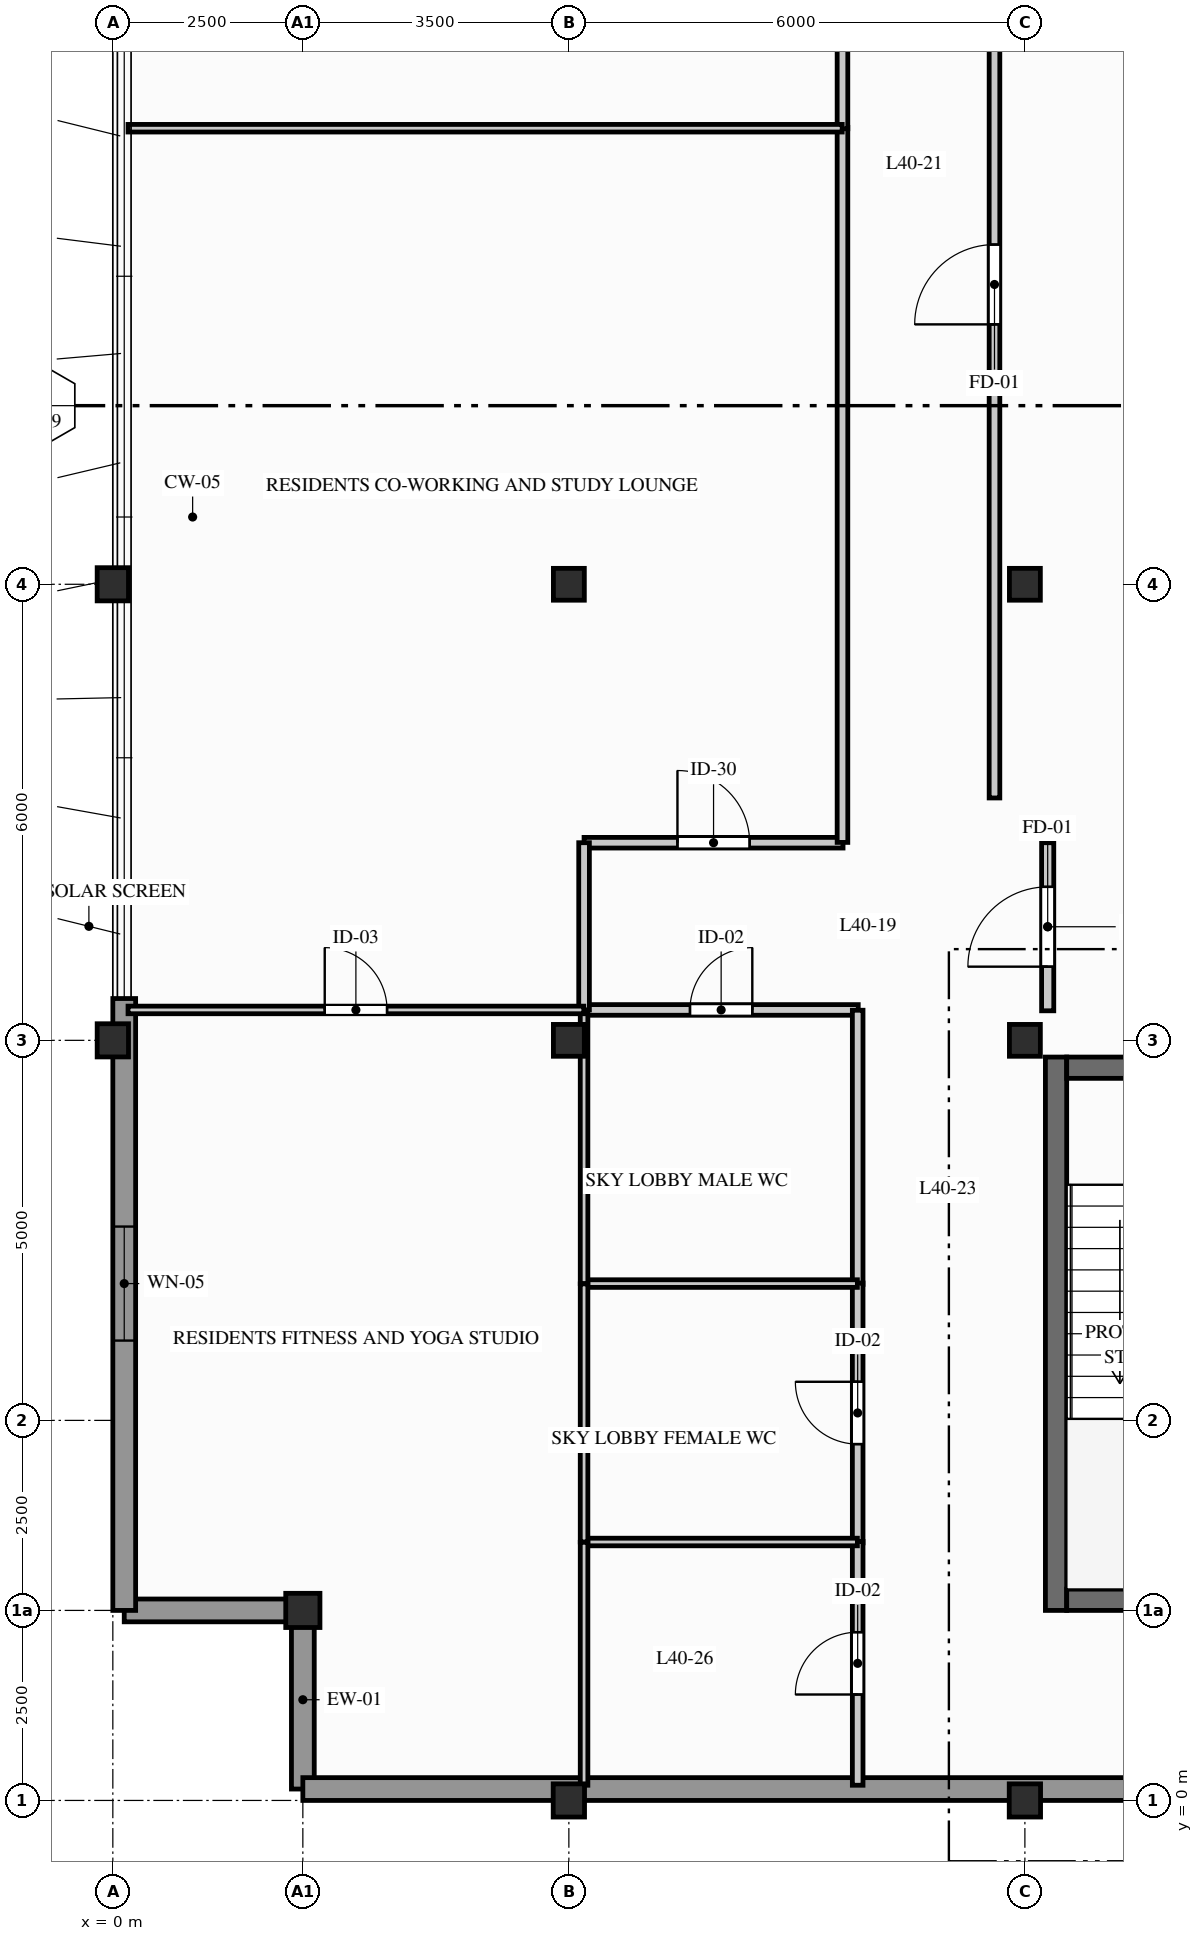
"""IFC4 building model, lengths in metres.
Left out: names, types, materials, properties, quantities, classifications, styles, units other than length and angle.
Written with IfcOpenShell. Run it as: python <this file> out.ifc"""

import sys

from ifc_helpers import new_model, si_unit, direction, frame, frame_2d, origin, origin_2d, place, context, subcontext, project, spatial, rectangle, hollow_rectangle, i_section, extrude, element, fill, save


model = new_model("IFC4")
c1 = context("Model", 3, precision=1e-05, world=origin(), true_north=direction((0.0, 1.0)))
c2 = subcontext(c1, "Body", "Model", "MODEL_VIEW")
j1 = project(units=[si_unit("LENGTHUNIT", "METRE"), si_unit("PLANEANGLEUNIT", "RADIAN")], contexts=[c1])
p1 = place(None, origin())
s1 = spatial("IfcSite", under=j1, at=p1, CompositionType="ELEMENT")
p2 = place(p1, origin())
s2 = spatial("IfcBuilding", under=s1, at=p2, CompositionType="ELEMENT")
p3 = place(p2, frame((0.0, 0.0, 134.5)))
s3 = spatial("IfcBuildingStorey", under=s2, at=p3, CompositionType="ELEMENT", Elevation=134.5)
for number, where, z_axis, x_axis in (
    (1, (0.0, 10.0, 0.0), (0.0, 0.0, 1.0), (1.0, 0.0, 0.0)),
    (2, (0.0, 16.0, 0.0), (0.0, 0.0, 1.0), (1.0, 0.0, 0.0)),
):
    element("IfcColumn", number, at=place(p3, frame(where, z_axis=z_axis, x_axis=x_axis)), inside=s3, PredefinedType="COLUMN", context=c2, shape_type="SweptSolid", body=[
        extrude(i_section(OverallWidth=0.412, OverallDepth=0.437, WebThickness=0.036, FlangeThickness=0.058, FilletRadius=0.015, at=origin_2d()), origin(), (0.0, 0.0, 1.0), 4.2),
    ])
p4 = place(p3, frame((2.5, 2.5, 0.0), z_axis=(0.0, 0.0, 1.0), x_axis=(1.0, 0.0, 0.0)))
e3 = element("IfcColumn", 3, at=p4, inside=s3, PredefinedType="COLUMN", context=c2, shape_type="SweptSolid", body=[
    extrude(hollow_rectangle(XDim=0.45, YDim=0.45, WallThickness=0.025, InnerFilletRadius=0.012, OuterFilletRadius=0.024, at=origin_2d()), origin(), (0.0, 0.0, 1.0), 4.2),
])
p5 = place(p3, frame((6.0, 0.0, 0.0), z_axis=(0.0, 0.0, 1.0), x_axis=(1.0, 0.0, 0.0)))
e4 = element("IfcColumn", 4, at=p5, inside=s3, PredefinedType="COLUMN", context=c2, shape_type="SweptSolid", body=[
    extrude(i_section(OverallWidth=0.412, OverallDepth=0.437, WebThickness=0.036, FlangeThickness=0.058, FilletRadius=0.015, at=origin_2d()), origin(), (0.0, 0.0, 1.0), 4.2),
])
for number, where, z_axis, x_axis in (
    (5, (6.0, 10.0, 0.0), (0.0, 0.0, 1.0), (1.0, 0.0, 0.0)),
    (6, (6.0, 16.0, 0.0), (0.0, 0.0, 1.0), (1.0, 0.0, 0.0)),
):
    element("IfcColumn", number, at=place(p3, frame(where, z_axis=z_axis, x_axis=x_axis)), inside=s3, PredefinedType="COLUMN", context=c2, shape_type="SweptSolid", body=[
        extrude(i_section(OverallWidth=0.407, OverallDepth=0.419, WebThickness=0.031, FlangeThickness=0.049, FilletRadius=0.015, at=origin_2d()), origin(), (0.0, 0.0, 1.0), 4.2),
    ])
p6 = place(p3, frame((12.0, 0.0, 0.0), z_axis=(0.0, 0.0, 1.0), x_axis=(1.0, 0.0, 0.0)))
e7 = element("IfcColumn", 7, at=p6, inside=s3, PredefinedType="COLUMN", context=c2, shape_type="SweptSolid", body=[
    extrude(i_section(OverallWidth=0.412, OverallDepth=0.437, WebThickness=0.036, FlangeThickness=0.058, FilletRadius=0.015, at=origin_2d()), origin(), (0.0, 0.0, 1.0), 4.2),
])
for number, where, z_axis, x_axis in (
    (8, (12.0, 10.0, 0.0), (0.0, 0.0, 1.0), (1.0, 0.0, 0.0)),
    (9, (12.0, 16.0, 0.0), (0.0, 0.0, 1.0), (1.0, 0.0, 0.0)),
):
    element("IfcColumn", number, at=place(p3, frame(where, z_axis=z_axis, x_axis=x_axis)), inside=s3, PredefinedType="COLUMN", context=c2, shape_type="SweptSolid", body=[
        extrude(i_section(OverallWidth=0.407, OverallDepth=0.419, WebThickness=0.031, FlangeThickness=0.049, FilletRadius=0.015, at=origin_2d()), origin(), (0.0, 0.0, 1.0), 4.2),
    ])
for number, where, z_axis, x_axis in (
    (10, (2.5, 2.5, 0.0), (0.0, 0.0, 1.0), (0.0, -1.0, 0.0)),
    (11, (0.15, 2.5, 0.0), (0.0, 0.0, 1.0), (1.0, 0.0, 0.0)),
):
    element("IfcWall", number, at=place(p3, frame(where, z_axis=z_axis, x_axis=x_axis)), inside=s3, PredefinedType="STANDARD", context=c2, shape_type="SweptSolid", body=[
        extrude(rectangle(XDim=2.35, YDim=0.3, at=frame_2d((1.175, 0.0))), origin(), (0.0, 0.0, 1.0), 3.98),
    ])
p7 = place(p3, frame((2.5, 0.15, 0.0), z_axis=(0.0, 0.0, 1.0), x_axis=(1.0, 0.0, 0.0)))
e12 = element("IfcWall", 12, at=p7, inside=s3, PredefinedType="STANDARD", context=c2, shape_type="SweptSolid", body=[
    extrude(rectangle(XDim=55.0, YDim=0.3, at=frame_2d((27.5, 0.0))), origin(), (0.0, 0.0, 1.0), 3.422),
])
p8 = place(p3, frame((0.15, 10.55, 0.0), z_axis=(0.0, 0.0, 1.0), x_axis=(0.0, -1.0, 0.0)))
e13 = element("IfcWall", 13, at=p8, inside=s3, PredefinedType="STANDARD", context=c2, shape_type="SweptSolid", body=[
    extrude(rectangle(XDim=8.05, YDim=0.3, at=frame_2d((4.025, 0.0))), origin(), (0.0, 0.0, 1.0), 3.98),
])
p9 = place(p8, frame((3.0, 0.0, 0.95)))
e14 = element("IfcOpeningElement", 14, at=p9, cuts=e13, PredefinedType="OPENING", context=c2, shape_type="SweptSolid", body=[
    extrude(rectangle(XDim=1.5, YDim=1.8, at=frame_2d((0.75, 0.9))), frame((0.0, 0.16, 0.0), z_axis=(0.0, -1.0, 0.0), x_axis=(1.0, 0.0, 0.0)), (0.0, 0.0, 1.0), 0.32),
])
p10 = place(p3, frame((12.41, 2.5, 0.0), z_axis=(0.0, 0.0, 1.0), x_axis=(0.0, 1.0, 0.0)))
e15 = element("IfcWall", 15, at=p10, inside=s3, PredefinedType="SHEAR", context=c2, shape_type="SweptSolid", body=[
    extrude(rectangle(XDim=7.28, YDim=0.28, at=frame_2d((3.64, 0.0))), origin(), (0.0, 0.0, 1.0), 3.98),
])
p11 = place(p3, frame((12.55, 2.64, 0.0), z_axis=(0.0, 0.0, 1.0), x_axis=(1.0, 0.0, 0.0)))
e16 = element("IfcWall", 16, at=p11, inside=s3, PredefinedType="SHEAR", context=c2, shape_type="SweptSolid", body=[
    extrude(rectangle(XDim=2.95, YDim=0.28, at=frame_2d((1.475, 0.0))), origin(), (0.0, 0.0, 1.0), 3.98),
])
p12 = place(p3, frame((15.5, 9.64, 0.0), z_axis=(0.0, 0.0, 1.0), x_axis=(-1.0, 0.0, 0.0)))
e17 = element("IfcWall", 17, at=p12, inside=s3, PredefinedType="SHEAR", context=c2, shape_type="SweptSolid", body=[
    extrude(rectangle(XDim=2.95, YDim=0.28, at=frame_2d((1.475, 0.0))), origin(), (0.0, 0.0, 1.0), 3.98),
])
p13 = place(p12, frame((0.95, 0.0, 0.0)))
e18 = element("IfcOpeningElement", 18, at=p13, cuts=e17, PredefinedType="OPENING", context=c2, shape_type="SweptSolid", body=[
    extrude(rectangle(XDim=1.05, YDim=2.06, at=frame_2d((0.525, 1.03))), frame((0.0, 0.15, 0.0), z_axis=(0.0, -1.0, 0.0), x_axis=(1.0, 0.0, 0.0)), (0.0, 0.0, 1.0), 0.3),
])
p14 = place(p3, frame((12.3, 10.389, 0.0), z_axis=(0.0, 0.0, 1.0), x_axis=(0.0, 1.0, 0.0)))
e19 = element("IfcWall", 19, at=p14, inside=s3, PredefinedType="PARTITIONING", context=c2, shape_type="SweptSolid", body=[
    extrude(rectangle(XDim=2.211, YDim=0.16, at=frame_2d((1.106, 0.0))), origin(), (0.0, 0.0, 1.0), 3.98),
])
p15 = place(p14, frame((0.581, 0.0, 0.0)))
e20 = element("IfcOpeningElement", 20, at=p15, cuts=e19, PredefinedType="OPENING", context=c2, shape_type="SweptSolid", body=[
    extrude(rectangle(XDim=1.05, YDim=2.06, at=frame_2d((0.525, 1.03))), frame((0.0, 0.09, 0.0), z_axis=(0.0, -1.0, 0.0), x_axis=(1.0, 0.0, 0.0)), (0.0, 0.0, 1.0), 0.18),
])
p16 = place(p3, frame((6.2, 10.4, 0.0), z_axis=(0.0, 0.0, 1.0), x_axis=(1.0, 0.0, 0.0)))
e21 = element("IfcWall", 21, at=p16, inside=s3, PredefinedType="PARTITIONING", context=c2, shape_type="SweptSolid", body=[
    extrude(rectangle(XDim=3.607, YDim=0.14, at=frame_2d((1.804, 0.0))), origin(), (0.0, 0.0, 1.0), 3.98),
])
p17 = place(p16, frame((1.394, 0.0, 0.0)))
e22 = element("IfcOpeningElement", 22, at=p17, cuts=e21, PredefinedType="OPENING", context=c2, shape_type="SweptSolid", body=[
    extrude(rectangle(XDim=0.82, YDim=2.02, at=frame_2d((0.41, 1.01))), frame((0.0, 0.08, 0.0), z_axis=(0.0, -1.0, 0.0), x_axis=(1.0, 0.0, 0.0)), (0.0, 0.0, 1.0), 0.16),
])
p18 = place(p3, frame((6.2, 12.6, 0.0), z_axis=(0.0, 0.0, 1.0), x_axis=(1.0, 0.0, 0.0)))
e23 = element("IfcWall", 23, at=p18, inside=s3, PredefinedType="PARTITIONING", context=c2, shape_type="SweptSolid", body=[
    extrude(rectangle(XDim=3.407, YDim=0.14, at=frame_2d((1.704, 0.0))), origin(), (0.0, 0.0, 1.0), 3.98),
])
p19 = place(p18, frame((1.229, 0.0, 0.0)))
e24 = element("IfcOpeningElement", 24, at=p19, cuts=e23, PredefinedType="OPENING", context=c2, shape_type="SweptSolid", body=[
    extrude(rectangle(XDim=0.95, YDim=2.05, at=frame_2d((0.475, 1.025))), frame((0.0, 0.08, 0.0), z_axis=(0.0, -1.0, 0.0), x_axis=(1.0, 0.0, 0.0)), (0.0, 0.0, 1.0), 0.16),
])
p20 = place(p3, frame((6.2, 10.4, 0.0), z_axis=(0.0, 0.0, 1.0), x_axis=(0.0, 1.0, 0.0)))
e25 = element("IfcWall", 25, at=p20, inside=s3, PredefinedType="PARTITIONING", context=c2, shape_type="SweptSolid", body=[
    extrude(rectangle(XDim=2.2, YDim=0.14, at=frame_2d((1.1, 0.0))), origin(), (0.0, 0.0, 1.0), 3.343),
])
p21 = place(p3, frame((9.6, 12.604, 0.0), z_axis=(0.0, 0.0, 1.0), x_axis=(0.0, 1.0, 0.0)))
e26 = element("IfcWall", 26, at=p21, inside=s3, PredefinedType="PARTITIONING", context=c2, shape_type="SweptSolid", body=[
    extrude(rectangle(XDim=9.407, YDim=0.14, at=frame_2d((4.704, 0.0))), origin(), (0.0, 0.0, 1.0), 3.343),
])
p22 = place(p3, frame((9.6, 21.993, 0.0), z_axis=(0.0, 0.0, 1.0), x_axis=(0.0, 1.0, 0.0)))
e27 = element("IfcWall", 27, at=p22, inside=s3, PredefinedType="PARTITIONING", context=c2, shape_type="SweptSolid", body=[
    extrude(rectangle(XDim=4.707, YDim=0.14, at=frame_2d((2.354, 0.0))), origin(), (0.0, 0.0, 1.0), 3.343),
])
p23 = place(p22, frame((1.879, 0.0, 0.0)))
e28 = element("IfcOpeningElement", 28, at=p23, cuts=e27, PredefinedType="OPENING", context=c2, shape_type="SweptSolid", body=[
    extrude(rectangle(XDim=0.95, YDim=2.05, at=frame_2d((0.475, 1.025))), frame((0.0, 0.08, 0.0), z_axis=(0.0, -1.0, 0.0), x_axis=(1.0, 0.0, 0.0)), (0.0, 0.0, 1.0), 0.16),
])
p24 = place(p3, frame((11.6, 13.189, 0.0), z_axis=(0.0, 0.0, 1.0), x_axis=(0.0, 1.0, 0.0)))
e29 = element("IfcWall", 29, at=p24, inside=s3, PredefinedType="PARTITIONING", context=c2, shape_type="SweptSolid", body=[
    extrude(rectangle(XDim=13.511, YDim=0.14, at=frame_2d((6.756, 0.0))), origin(), (0.0, 0.0, 1.0), 3.343),
])
p25 = place(p24, frame((6.231, 0.0, 0.0)))
e30 = element("IfcOpeningElement", 30, at=p25, cuts=e29, PredefinedType="OPENING", context=c2, shape_type="SweptSolid", body=[
    extrude(rectangle(XDim=1.05, YDim=2.06, at=frame_2d((0.525, 1.03))), frame((0.0, 0.08, 0.0), z_axis=(0.0, -1.0, 0.0), x_axis=(1.0, 0.0, 0.0)), (0.0, 0.0, 1.0), 0.16),
])
p26 = place(p3, frame((9.8, 6.789, 0.0), z_axis=(0.0, 0.0, 1.0), x_axis=(0.0, 1.0, 0.0)))
e31 = element("IfcWall", 31, at=p26, inside=s3, PredefinedType="PARTITIONING", context=c2, shape_type="SweptSolid", body=[
    extrude(rectangle(XDim=3.607, YDim=0.14, at=frame_2d((1.804, 0.0))), origin(), (0.0, 0.0, 1.0), 3.343),
])
p27 = place(p3, frame((9.8, 3.389, 0.0), z_axis=(0.0, 0.0, 1.0), x_axis=(0.0, 1.0, 0.0)))
e32 = element("IfcWall", 32, at=p27, inside=s3, PredefinedType="PARTITIONING", context=c2, shape_type="SweptSolid", body=[
    extrude(rectangle(XDim=3.419, YDim=0.14, at=frame_2d((1.709, 0.0))), origin(), (0.0, 0.0, 1.0), 3.98),
])
p28 = place(p27, frame((1.299, 0.0, 0.0)))
e33 = element("IfcOpeningElement", 33, at=p28, cuts=e32, PredefinedType="OPENING", context=c2, shape_type="SweptSolid", body=[
    extrude(rectangle(XDim=0.82, YDim=2.02, at=frame_2d((0.41, 1.01))), frame((0.0, 0.08, 0.0), z_axis=(0.0, -1.0, 0.0), x_axis=(1.0, 0.0, 0.0)), (0.0, 0.0, 1.0), 0.16),
])
p29 = place(p3, frame((9.8, 0.2, 0.0), z_axis=(0.0, 0.0, 1.0), x_axis=(0.0, 1.0, 0.0)))
e34 = element("IfcWall", 34, at=p29, inside=s3, PredefinedType="PARTITIONING", context=c2, shape_type="SweptSolid", body=[
    extrude(rectangle(XDim=3.207, YDim=0.14, at=frame_2d((1.604, 0.0))), origin(), (0.0, 0.0, 1.0), 3.98),
])
p30 = place(p29, frame((1.194, 0.0, 0.0)))
e35 = element("IfcOpeningElement", 35, at=p30, cuts=e34, PredefinedType="OPENING", context=c2, shape_type="SweptSolid", body=[
    extrude(rectangle(XDim=0.82, YDim=2.02, at=frame_2d((0.41, 1.01))), frame((0.0, 0.08, 0.0), z_axis=(0.0, -1.0, 0.0), x_axis=(1.0, 0.0, 0.0)), (0.0, 0.0, 1.0), 0.16),
])
p31 = place(p3, frame((6.2, 6.8, 0.0), z_axis=(0.0, 0.0, 1.0), x_axis=(1.0, 0.0, 0.0)))
e36 = element("IfcWall", 36, at=p31, inside=s3, PredefinedType="PARTITIONING", context=c2, shape_type="SweptSolid", body=[
    extrude(rectangle(XDim=3.596, YDim=0.1, at=frame_2d((1.798, 0.0))), origin(), (0.0, 0.0, 1.0), 3.98),
])
p32 = place(p3, frame((6.2, 6.8, 0.0), z_axis=(0.0, 0.0, 1.0), x_axis=(0.0, 1.0, 0.0)))
e37 = element("IfcWall", 37, at=p32, inside=s3, PredefinedType="PARTITIONING", context=c2, shape_type="SweptSolid", body=[
    extrude(rectangle(XDim=3.596, YDim=0.1, at=frame_2d((1.798, 0.0))), origin(), (0.0, 0.0, 1.0), 3.343),
])
p33 = place(p3, frame((6.2, 3.4, 0.0), z_axis=(0.0, 0.0, 1.0), x_axis=(1.0, 0.0, 0.0)))
e38 = element("IfcWall", 38, at=p33, inside=s3, PredefinedType="PARTITIONING", context=c2, shape_type="SweptSolid", body=[
    extrude(rectangle(XDim=3.596, YDim=0.1, at=frame_2d((1.798, 0.0))), origin(), (0.0, 0.0, 1.0), 3.98),
])
p34 = place(p3, frame((6.2, 3.4, 0.0), z_axis=(0.0, 0.0, 1.0), x_axis=(0.0, 1.0, 0.0)))
e39 = element("IfcWall", 39, at=p34, inside=s3, PredefinedType="PARTITIONING", context=c2, shape_type="SweptSolid", body=[
    extrude(rectangle(XDim=3.396, YDim=0.1, at=frame_2d((1.698, 0.0))), origin(), (0.0, 0.0, 1.0), 3.343),
])
p35 = place(p3, frame((6.2, 0.2, 0.0), z_axis=(0.0, 0.0, 1.0), x_axis=(0.0, 1.0, 0.0)))
e40 = element("IfcWall", 40, at=p35, inside=s3, PredefinedType="PARTITIONING", context=c2, shape_type="SweptSolid", body=[
    extrude(rectangle(XDim=3.196, YDim=0.1, at=frame_2d((1.598, 0.0))), origin(), (0.0, 0.0, 1.0), 3.343),
])
p36 = place(p3, frame((0.2, 22.0, 0.0), z_axis=(0.0, 0.0, 1.0), x_axis=(1.0, 0.0, 0.0)))
e41 = element("IfcWall", 41, at=p36, inside=s3, PredefinedType="PARTITIONING", context=c2, shape_type="SweptSolid", body=[
    extrude(rectangle(XDim=9.396, YDim=0.1, at=frame_2d((4.698, 0.0))), origin(), (0.0, 0.0, 1.0), 3.343),
])
p37 = place(p3, frame((0.2, 10.4, 0.0), z_axis=(0.0, 0.0, 1.0), x_axis=(1.0, 0.0, 0.0)))
e42 = element("IfcWall", 42, at=p37, inside=s3, PredefinedType="PARTITIONING", context=c2, shape_type="SweptSolid", body=[
    extrude(rectangle(XDim=5.996, YDim=0.1, at=frame_2d((2.998, 0.0))), origin(), (0.0, 0.0, 1.0), 3.343),
])
p38 = place(p37, frame((2.588, 0.0, 0.0)))
e43 = element("IfcOpeningElement", 43, at=p38, cuts=e42, PredefinedType="OPENING", context=c2, shape_type="SweptSolid", body=[
    extrude(rectangle(XDim=0.82, YDim=2.02, at=frame_2d((0.41, 1.01))), frame((0.0, 0.06, 0.0), z_axis=(0.0, -1.0, 0.0), x_axis=(1.0, 0.0, 0.0)), (0.0, 0.0, 1.0), 0.12),
])
p39 = place(p9, origin())
e44 = element("IfcWindow", 44, at=p39, inside=s3, PartitioningType="SINGLE_PANEL", PredefinedType="WINDOW", context=c2, shape_type="SweptSolid", body=[
    extrude(rectangle(XDim=1.5, YDim=1.8, at=frame_2d((0.75, 0.9))), frame((0.0, 0.03, 0.0), z_axis=(0.0, -1.0, 0.0), x_axis=(1.0, 0.0, 0.0)), (0.0, 0.0, 1.0), 0.06),
])
fill(e14, e44)
p40 = place(p15, origin())
e45 = element("IfcDoor", 45, at=p40, inside=s3, OperationType="SINGLE_SWING_LEFT", PredefinedType="DOOR", context=c2, shape_type="SweptSolid", body=[
    extrude(rectangle(XDim=1.05, YDim=2.06, at=frame_2d((0.525, 1.03))), frame((0.0, 0.025, 0.0), z_axis=(0.0, -1.0, 0.0), x_axis=(1.0, 0.0, 0.0)), (0.0, 0.0, 1.0), 0.05),
])
fill(e20, e45)
p41 = place(p17, origin())
e46 = element("IfcDoor", 46, at=p41, inside=s3, OperationType="SINGLE_SWING_RIGHT", PredefinedType="DOOR", context=c2, shape_type="SweptSolid", body=[
    extrude(rectangle(XDim=0.82, YDim=2.02, at=frame_2d((0.41, 1.01))), frame((0.0, 0.025, 0.0), z_axis=(0.0, -1.0, 0.0), x_axis=(1.0, 0.0, 0.0)), (0.0, 0.0, 1.0), 0.05),
])
fill(e22, e46)
p42 = place(p19, origin())
e47 = element("IfcDoor", 47, at=p42, inside=s3, OperationType="SINGLE_SWING_LEFT", PredefinedType="DOOR", context=c2, shape_type="SweptSolid", body=[
    extrude(rectangle(XDim=0.95, YDim=2.05, at=frame_2d((0.475, 1.025))), frame((0.0, 0.025, 0.0), z_axis=(0.0, -1.0, 0.0), x_axis=(1.0, 0.0, 0.0)), (0.0, 0.0, 1.0), 0.05),
])
fill(e24, e47)
p43 = place(p25, origin())
e48 = element("IfcDoor", 48, at=p43, inside=s3, OperationType="SINGLE_SWING_LEFT", PredefinedType="DOOR", context=c2, shape_type="SweptSolid", body=[
    extrude(rectangle(XDim=1.05, YDim=2.06, at=frame_2d((0.525, 1.03))), frame((0.0, 0.025, 0.0), z_axis=(0.0, -1.0, 0.0), x_axis=(1.0, 0.0, 0.0)), (0.0, 0.0, 1.0), 0.05),
])
fill(e30, e48)
p44 = place(p28, origin())
e49 = element("IfcDoor", 49, at=p44, inside=s3, OperationType="SINGLE_SWING_RIGHT", PredefinedType="DOOR", context=c2, shape_type="SweptSolid", body=[
    extrude(rectangle(XDim=0.82, YDim=2.02, at=frame_2d((0.41, 1.01))), frame((0.0, 0.025, 0.0), z_axis=(0.0, -1.0, 0.0), x_axis=(1.0, 0.0, 0.0)), (0.0, 0.0, 1.0), 0.05),
])
fill(e33, e49)
p45 = place(p30, origin())
e50 = element("IfcDoor", 50, at=p45, inside=s3, OperationType="SINGLE_SWING_LEFT", PredefinedType="DOOR", context=c2, shape_type="SweptSolid", body=[
    extrude(rectangle(XDim=0.82, YDim=2.02, at=frame_2d((0.41, 1.01))), frame((0.0, 0.025, 0.0), z_axis=(0.0, -1.0, 0.0), x_axis=(1.0, 0.0, 0.0)), (0.0, 0.0, 1.0), 0.05),
])
fill(e35, e50)
p46 = place(p38, origin())
e51 = element("IfcDoor", 51, at=p46, inside=s3, OperationType="SINGLE_SWING_LEFT", PredefinedType="DOOR", context=c2, shape_type="SweptSolid", body=[
    extrude(rectangle(XDim=0.82, YDim=2.02, at=frame_2d((0.41, 1.01))), frame((0.0, 0.025, 0.0), z_axis=(0.0, -1.0, 0.0), x_axis=(1.0, 0.0, 0.0)), (0.0, 0.0, 1.0), 0.05),
])
fill(e43, e51)
save(model, sys.argv[1])
